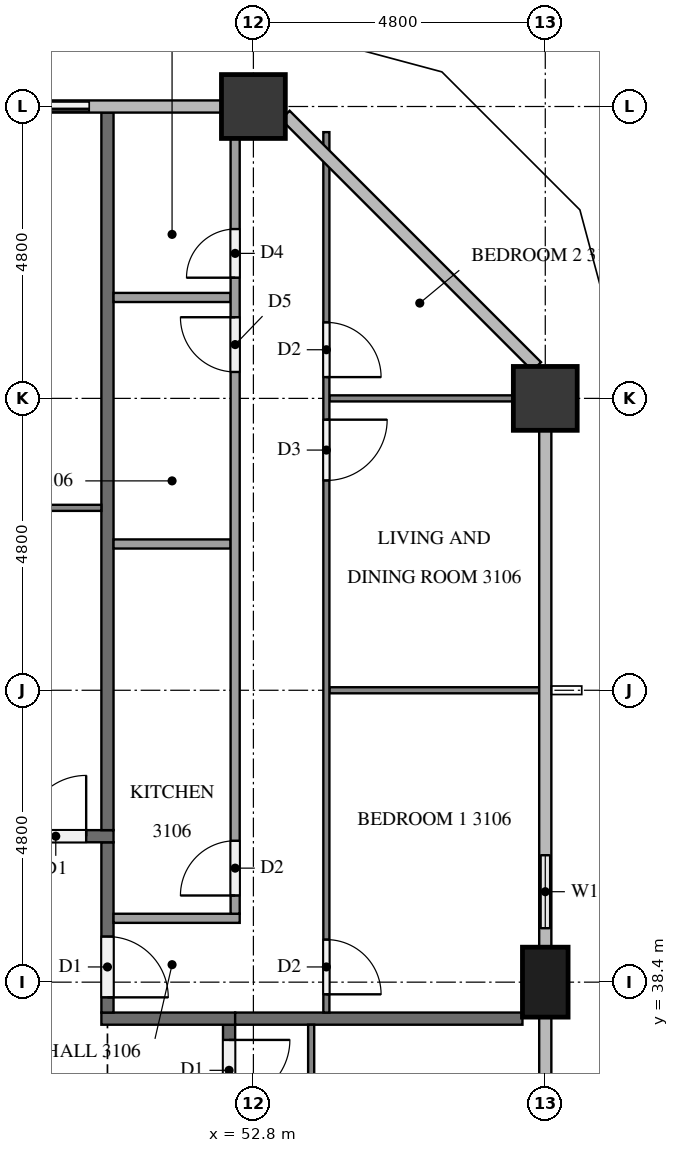
"""IFC4 building model, lengths in metres.
Left out: names, types, materials, properties, quantities, classifications, styles, units other than length and angle.
Written with IfcOpenShell. Run it as: python <this file> out.ifc"""

import sys

from ifc_helpers import new_model, si_unit, direction, frame, frame_2d, origin, origin_2d, place, context, subcontext, project, spatial, rectangle, extrude, element, fill, save


model = new_model("IFC4")
c1 = context("Model", 3, precision=1e-05, world=origin(), true_north=direction((0.0, 1.0)))
c2 = subcontext(c1, "Body", "Model", "MODEL_VIEW")
j1 = project(units=[si_unit("LENGTHUNIT", "METRE"), si_unit("PLANEANGLEUNIT", "RADIAN")], contexts=[c1])
p1 = place(None, origin())
s1 = spatial("IfcSite", under=j1, at=p1, CompositionType="ELEMENT")
p2 = place(p1, origin())
s2 = spatial("IfcBuilding", under=s1, at=p2, CompositionType="ELEMENT")
p3 = place(p2, frame((0.0, 0.0, 122.6)))
s3 = spatial("IfcBuildingStorey", under=s2, at=p3, CompositionType="ELEMENT", Elevation=122.6)
p4 = place(p3, frame((57.6, 38.4, 0.0), z_axis=(0.0, 0.0, 1.0), x_axis=(0.0, 1.0, 0.0)))
e1 = element("IfcColumn", 1, at=p4, inside=s3, PredefinedType="COLUMN", context=c2, shape_type="SweptSolid", body=[
    extrude(rectangle(XDim=1.15, YDim=0.75, at=origin_2d()), origin(), (0.0, 0.0, 1.0), 3.2),
])
for number, where, z_axis, x_axis in (
    (2, (57.6, 48.0, 0.0), (0.0, 0.0, 1.0), (1.0, 0.0, 0.0)),
    (3, (52.8, 52.8, 0.0), (0.0, 0.0, 1.0), (1.0, 0.0, 0.0)),
):
    element("IfcColumn", number, at=place(p3, frame(where, z_axis=z_axis, x_axis=x_axis)), inside=s3, PredefinedType="COLUMN", context=c2, shape_type="SweptSolid", body=[
        extrude(rectangle(XDim=1.05, YDim=1.05, at=origin_2d()), origin(), (0.0, 0.0, 1.0), 3.2),
    ])
p5 = place(p3, frame((57.6, 38.975, 0.0), z_axis=(0.0, 0.0, 1.0), x_axis=(0.0, 1.0, 0.0)))
e4 = element("IfcWall", 4, at=p5, inside=s3, PredefinedType="SOLIDWALL", context=c2, shape_type="SweptSolid", body=[
    extrude(rectangle(XDim=1.825, YDim=0.15, at=frame_2d((0.913, 0.0))), origin(), (0.0, 0.0, 1.0), 3.2),
])
p6 = place(p5, frame((0.312, 0.0, 0.9)))
e5 = element("IfcOpeningElement", 5, at=p6, cuts=e4, PredefinedType="OPENING", context=c2, shape_type="SweptSolid", body=[
    extrude(rectangle(XDim=1.2, YDim=1.4, at=frame_2d((0.6, 0.7))), frame((0.0, 0.085, 0.0), z_axis=(0.0, -1.0, 0.0), x_axis=(1.0, 0.0, 0.0)), (0.0, 0.0, 1.0), 0.17),
])
p7 = place(p3, frame((50.4, 52.8, 0.0), z_axis=(0.0, 0.0, 1.0), x_axis=(-1.0, 0.0, 0.0)))
e6 = element("IfcWall", 6, at=p7, inside=s3, PredefinedType="SOLIDWALL", context=c2, shape_type="SweptSolid", body=[
    extrude(rectangle(XDim=2.4, YDim=0.15, at=frame_2d((1.2, 0.0))), origin(), (0.0, 0.0, 1.0), 3.2),
])
p8 = place(p7, frame((0.3, 0.0, 0.0)))
e7 = element("IfcOpeningElement", 7, at=p8, cuts=e6, PredefinedType="OPENING", context=c2, shape_type="SweptSolid", body=[
    extrude(rectangle(XDim=1.8, YDim=2.4, at=frame_2d((0.9, 1.2))), frame((0.0, 0.085, 0.0), z_axis=(0.0, -1.0, 0.0), x_axis=(1.0, 0.0, 0.0)), (0.0, 0.0, 1.0), 0.17),
])
p9 = place(p3, frame((52.4, 37.7, 0.0), z_axis=(0.0, 0.0, 1.0), x_axis=(0.0, -1.0, 0.0)))
e8 = element("IfcWall", 8, at=p9, inside=s3, PredefinedType="PARTITIONING", context=c2, shape_type="SweptSolid", body=[
    extrude(rectangle(XDim=22.6, YDim=0.2, at=frame_2d((11.3, 0.0))), origin(), (0.0, 0.0, 1.0), 3.2),
])
p10 = place(p9, frame((0.25, 0.0, 0.0)))
e9 = element("IfcOpeningElement", 9, at=p10, cuts=e8, PredefinedType="OPENING", context=c2, shape_type="SweptSolid", body=[
    extrude(rectangle(XDim=1.0, YDim=2.1, at=frame_2d((0.5, 1.05))), frame((0.0, 0.11, 0.0), z_axis=(0.0, -1.0, 0.0), x_axis=(1.0, 0.0, 0.0)), (0.0, 0.0, 1.0), 0.22),
])
p11 = place(p3, frame((52.5, 37.8, 0.0), z_axis=(0.0, 0.0, 1.0), x_axis=(-1.0, 0.0, 0.0)))
e10 = element("IfcWall", 10, at=p11, inside=s3, PredefinedType="PARTITIONING", context=c2, shape_type="SweptSolid", body=[
    extrude(rectangle(XDim=2.2, YDim=0.2, at=frame_2d((1.1, 0.0))), origin(), (0.0, 0.0, 1.0), 3.2),
])
p12 = place(p3, frame((50.4, 40.7, 0.0), z_axis=(0.0, 0.0, 1.0), x_axis=(0.0, -1.0, 0.0)))
e11 = element("IfcWall", 11, at=p12, inside=s3, PredefinedType="PARTITIONING", context=c2, shape_type="SweptSolid", body=[
    extrude(rectangle(XDim=2.8, YDim=0.2, at=frame_2d((1.4, 0.0))), origin(), (0.0, 0.0, 1.0), 3.2),
])
p13 = place(p12, frame((1.55, 0.0, 0.0)))
e12 = element("IfcOpeningElement", 12, at=p13, cuts=e11, PredefinedType="OPENING", context=c2, shape_type="SweptSolid", body=[
    extrude(rectangle(XDim=1.0, YDim=2.1, at=frame_2d((0.5, 1.05))), frame((0.0, 0.11, 0.0), z_axis=(0.0, -1.0, 0.0), x_axis=(1.0, 0.0, 0.0)), (0.0, 0.0, 1.0), 0.22),
])
p14 = place(p3, frame((11.9, 40.8, 0.0), z_axis=(0.0, 0.0, 1.0), x_axis=(1.0, 0.0, 0.0)))
e13 = element("IfcWall", 13, at=p14, inside=s3, PredefinedType="PARTITIONING", context=c2, shape_type="SweptSolid", body=[
    extrude(rectangle(XDim=38.6, YDim=0.2, at=frame_2d((19.3, 0.0))), origin(), (0.0, 0.0, 1.0), 3.2),
])
p15 = place(p14, frame((37.15, 0.0, 0.0)))
e14 = element("IfcOpeningElement", 14, at=p15, cuts=e13, PredefinedType="OPENING", context=c2, shape_type="SweptSolid", body=[
    extrude(rectangle(XDim=1.0, YDim=2.1, at=frame_2d((0.5, 1.05))), frame((0.0, 0.11, 0.0), z_axis=(0.0, -1.0, 0.0), x_axis=(1.0, 0.0, 0.0)), (0.0, 0.0, 1.0), 0.22),
])
p16 = place(p14, frame((27.55, 0.0, 0.0)))
e15 = element("IfcOpeningElement", 15, at=p16, cuts=e13, PredefinedType="OPENING", context=c2, shape_type="SweptSolid", body=[
    extrude(rectangle(XDim=1.0, YDim=2.1, at=frame_2d((0.5, 1.05))), frame((0.0, 0.11, 0.0), z_axis=(0.0, -1.0, 0.0), x_axis=(1.0, 0.0, 0.0)), (0.0, 0.0, 1.0), 0.22),
])
p17 = place(p14, frame((13.15, 0.0, 0.0)))
e16 = element("IfcOpeningElement", 16, at=p17, cuts=e13, PredefinedType="OPENING", context=c2, shape_type="SweptSolid", body=[
    extrude(rectangle(XDim=1.0, YDim=2.1, at=frame_2d((0.5, 1.05))), frame((0.0, 0.11, 0.0), z_axis=(0.0, -1.0, 0.0), x_axis=(1.0, 0.0, 0.0)), (0.0, 0.0, 1.0), 0.22),
])
p18 = place(p3, frame((52.5, 37.8, 0.0), z_axis=(0.0, 0.0, 1.0), x_axis=(1.0, 0.0, 0.0)))
e17 = element("IfcWall", 17, at=p18, inside=s3, PredefinedType="PARTITIONING", context=c2, shape_type="SweptSolid", body=[
    extrude(rectangle(XDim=4.725, YDim=0.2, at=frame_2d((2.363, 0.0))), origin(), (0.0, 0.0, 1.0), 3.2),
])
p19 = place(p3, frame((50.4, 40.9, 0.0), z_axis=(0.0, 0.0, 1.0), x_axis=(0.0, 1.0, 0.0)))
e18 = element("IfcWall", 18, at=p19, inside=s3, PredefinedType="PARTITIONING", context=c2, shape_type="SweptSolid", body=[
    extrude(rectangle(XDim=11.8, YDim=0.2, at=frame_2d((5.9, 0.0))), origin(), (0.0, 0.0, 1.0), 3.2),
])
p20 = place(p3, frame((53.75, 37.7, 0.0), z_axis=(0.0, 0.0, 1.0), x_axis=(0.0, -1.0, 0.0)))
e19 = element("IfcWall", 19, at=p20, inside=s3, PredefinedType="PARTITIONING", context=c2, shape_type="SweptSolid", body=[
    extrude(rectangle(XDim=22.6, YDim=0.1, at=frame_2d((11.3, 0.0))), origin(), (0.0, 0.0, 1.0), 3.2),
])
p21 = place(p20, frame((2.85, 0.0, 0.0)))
e20 = element("IfcOpeningElement", 20, at=p21, cuts=e19, PredefinedType="OPENING", context=c2, shape_type="SweptSolid", body=[
    extrude(rectangle(XDim=0.9, YDim=2.1, at=frame_2d((0.45, 1.05))), frame((0.0, 0.06, 0.0), z_axis=(0.0, -1.0, 0.0), x_axis=(1.0, 0.0, 0.0)), (0.0, 0.0, 1.0), 0.12),
])
p22 = place(p20, frame((4.45, 0.0, 0.0)))
e21 = element("IfcOpeningElement", 21, at=p22, cuts=e19, PredefinedType="OPENING", context=c2, shape_type="SweptSolid", body=[
    extrude(rectangle(XDim=0.8, YDim=2.1, at=frame_2d((0.4, 1.05))), frame((0.0, 0.06, 0.0), z_axis=(0.0, -1.0, 0.0), x_axis=(1.0, 0.0, 0.0)), (0.0, 0.0, 1.0), 0.12),
])
p23 = place(p20, frame((7.65, 0.0, 0.0)))
e22 = element("IfcOpeningElement", 22, at=p23, cuts=e19, PredefinedType="OPENING", context=c2, shape_type="SweptSolid", body=[
    extrude(rectangle(XDim=0.9, YDim=2.1, at=frame_2d((0.45, 1.05))), frame((0.0, 0.06, 0.0), z_axis=(0.0, -1.0, 0.0), x_axis=(1.0, 0.0, 0.0)), (0.0, 0.0, 1.0), 0.12),
])
p24 = place(p20, frame((9.25, 0.0, 0.0)))
e23 = element("IfcOpeningElement", 23, at=p24, cuts=e19, PredefinedType="OPENING", context=c2, shape_type="SweptSolid", body=[
    extrude(rectangle(XDim=0.9, YDim=2.1, at=frame_2d((0.45, 1.05))), frame((0.0, 0.06, 0.0), z_axis=(0.0, -1.0, 0.0), x_axis=(1.0, 0.0, 0.0)), (0.0, 0.0, 1.0), 0.12),
])
p25 = place(p20, frame((17.15, 0.0, 0.0)))
e24 = element("IfcOpeningElement", 24, at=p25, cuts=e19, PredefinedType="OPENING", context=c2, shape_type="SweptSolid", body=[
    extrude(rectangle(XDim=1.0, YDim=2.1, at=frame_2d((0.5, 1.05))), frame((0.0, 0.06, 0.0), z_axis=(0.0, -1.0, 0.0), x_axis=(1.0, 0.0, 0.0)), (0.0, 0.0, 1.0), 0.12),
])
p26 = place(p20, frame((18.85, 0.0, 0.0)))
e25 = element("IfcOpeningElement", 25, at=p26, cuts=e19, PredefinedType="OPENING", context=c2, shape_type="SweptSolid", body=[
    extrude(rectangle(XDim=0.9, YDim=2.1, at=frame_2d((0.45, 1.05))), frame((0.0, 0.06, 0.0), z_axis=(0.0, -1.0, 0.0), x_axis=(1.0, 0.0, 0.0)), (0.0, 0.0, 1.0), 0.12),
])
p27 = place(p3, frame((54.05, 43.2, 0.0), z_axis=(0.0, 0.0, 1.0), x_axis=(1.0, 0.0, 0.0)))
e26 = element("IfcWall", 26, at=p27, inside=s3, PredefinedType="PARTITIONING", context=c2, shape_type="SweptSolid", body=[
    extrude(rectangle(XDim=3.45, YDim=0.1, at=frame_2d((1.725, 0.0))), origin(), (0.0, 0.0, 1.0), 3.2),
])
p28 = place(p3, frame((54.05, 48.0, 0.0), z_axis=(0.0, 0.0, 1.0), x_axis=(1.0, 0.0, 0.0)))
e27 = element("IfcWall", 27, at=p28, inside=s3, PredefinedType="PARTITIONING", context=c2, shape_type="SweptSolid", body=[
    extrude(rectangle(XDim=3.025, YDim=0.1, at=frame_2d((1.512, 0.0))), origin(), (0.0, 0.0, 1.0), 3.2),
])
p29 = place(p3, frame((54.0, 52.378, 0.0), z_axis=(0.0, 0.0, 1.0), x_axis=(0.0, -1.0, 0.0)))
e28 = element("IfcWall", 28, at=p29, inside=s3, PredefinedType="PARTITIONING", context=c2, shape_type="SweptSolid", body=[
    extrude(rectangle(XDim=14.479, YDim=0.1, at=frame_2d((7.239, 0.0))), origin(), (0.0, 0.0, 1.0), 3.2),
])
p30 = place(p29, frame((13.279, 0.0, 0.0)))
e29 = element("IfcOpeningElement", 29, at=p30, cuts=e28, PredefinedType="OPENING", context=c2, shape_type="SweptSolid", body=[
    extrude(rectangle(XDim=0.9, YDim=2.1, at=frame_2d((0.45, 1.05))), frame((0.0, 0.06, 0.0), z_axis=(0.0, -1.0, 0.0), x_axis=(1.0, 0.0, 0.0)), (0.0, 0.0, 1.0), 0.12),
])
p31 = place(p29, frame((4.729, 0.0, 0.0)))
e30 = element("IfcOpeningElement", 30, at=p31, cuts=e28, PredefinedType="OPENING", context=c2, shape_type="SweptSolid", body=[
    extrude(rectangle(XDim=1.0, YDim=2.1, at=frame_2d((0.5, 1.05))), frame((0.0, 0.06, 0.0), z_axis=(0.0, -1.0, 0.0), x_axis=(1.0, 0.0, 0.0)), (0.0, 0.0, 1.0), 0.12),
])
p32 = place(p29, frame((3.128, 0.0, 0.0)))
e31 = element("IfcOpeningElement", 31, at=p32, cuts=e28, PredefinedType="OPENING", context=c2, shape_type="SweptSolid", body=[
    extrude(rectangle(XDim=0.9, YDim=2.1, at=frame_2d((0.45, 1.05))), frame((0.0, 0.06, 0.0), z_axis=(0.0, -1.0, 0.0), x_axis=(1.0, 0.0, 0.0)), (0.0, 0.0, 1.0), 0.12),
])
for number, where, z_axis, x_axis in (
    (32, (50.5, 45.606, 0.0), (0.0, 0.0, 1.0), (1.0, 0.0, 0.0)),
    (33, (50.5, 49.66, 0.0), (0.0, 0.0, 1.0), (1.0, 0.0, 0.0)),
):
    element("IfcWall", number, at=place(p3, frame(where, z_axis=z_axis, x_axis=x_axis)), inside=s3, PredefinedType="PARTITIONING", context=c2, shape_type="SweptSolid", body=[
        extrude(rectangle(XDim=1.925, YDim=0.15, at=frame_2d((0.962, 0.0))), origin(), (0.0, 0.0, 1.0), 3.2),
    ])
p33 = place(p3, frame((50.5, 39.45, 0.0), z_axis=(0.0, 0.0, 1.0), x_axis=(1.0, 0.0, 0.0)))
e34 = element("IfcWall", 34, at=p33, inside=s3, PredefinedType="PARTITIONING", context=c2, shape_type="SweptSolid", body=[
    extrude(rectangle(XDim=2.075, YDim=0.15, at=frame_2d((1.038, 0.0))), origin(), (0.0, 0.0, 1.0), 3.2),
])
p34 = place(p3, frame((52.5, 39.525, 0.0), z_axis=(0.0, 0.0, 1.0), x_axis=(0.0, 1.0, 0.0)))
e35 = element("IfcWall", 35, at=p34, inside=s3, PredefinedType="PARTITIONING", context=c2, shape_type="SweptSolid", body=[
    extrude(rectangle(XDim=12.75, YDim=0.15, at=frame_2d((6.375, 0.0))), origin(), (0.0, 0.0, 1.0), 3.2),
])
p35 = place(p34, frame((0.3, 0.0, 0.0)))
e36 = element("IfcOpeningElement", 36, at=p35, cuts=e35, PredefinedType="OPENING", context=c2, shape_type="SweptSolid", body=[
    extrude(rectangle(XDim=0.9, YDim=2.1, at=frame_2d((0.45, 1.05))), frame((0.0, 0.085, 0.0), z_axis=(0.0, -1.0, 0.0), x_axis=(1.0, 0.0, 0.0)), (0.0, 0.0, 1.0), 0.17),
])
p36 = place(p34, frame((8.91, 0.0, 0.0)))
e37 = element("IfcOpeningElement", 37, at=p36, cuts=e35, PredefinedType="OPENING", context=c2, shape_type="SweptSolid", body=[
    extrude(rectangle(XDim=0.9, YDim=2.1, at=frame_2d((0.45, 1.05))), frame((0.0, 0.085, 0.0), z_axis=(0.0, -1.0, 0.0), x_axis=(1.0, 0.0, 0.0)), (0.0, 0.0, 1.0), 0.17),
])
p37 = place(p34, frame((10.46, 0.0, 0.0)))
e38 = element("IfcOpeningElement", 38, at=p37, cuts=e35, PredefinedType="OPENING", context=c2, shape_type="SweptSolid", body=[
    extrude(rectangle(XDim=0.8, YDim=2.1, at=frame_2d((0.4, 1.05))), frame((0.0, 0.085, 0.0), z_axis=(0.0, -1.0, 0.0), x_axis=(1.0, 0.0, 0.0)), (0.0, 0.0, 1.0), 0.17),
])
p38 = place(p3, frame((40.9, 46.2, 0.0), z_axis=(0.0, 0.0, 1.0), x_axis=(1.0, 0.0, 0.0)))
e39 = element("IfcWall", 39, at=p38, inside=s3, PredefinedType="PARTITIONING", context=c2, shape_type="SweptSolid", body=[
    extrude(rectangle(XDim=9.4, YDim=0.1, at=frame_2d((4.7, 0.0))), origin(), (0.0, 0.0, 1.0), 3.2),
])
p39 = place(p38, frame((5.05, 0.0, 0.0)))
e40 = element("IfcOpeningElement", 40, at=p39, cuts=e39, PredefinedType="OPENING", context=c2, shape_type="SweptSolid", body=[
    extrude(rectangle(XDim=1.0, YDim=2.1, at=frame_2d((0.5, 1.05))), frame((0.0, 0.06, 0.0), z_axis=(0.0, -1.0, 0.0), x_axis=(1.0, 0.0, 0.0)), (0.0, 0.0, 1.0), 0.12),
])
p40 = place(p38, frame((3.45, 0.0, 0.0)))
e41 = element("IfcOpeningElement", 41, at=p40, cuts=e39, PredefinedType="OPENING", context=c2, shape_type="SweptSolid", body=[
    extrude(rectangle(XDim=0.9, YDim=2.1, at=frame_2d((0.45, 1.05))), frame((0.0, 0.06, 0.0), z_axis=(0.0, -1.0, 0.0), x_axis=(1.0, 0.0, 0.0)), (0.0, 0.0, 1.0), 0.12),
])
p41 = place(p6, origin())
e42 = element("IfcWindow", 42, at=p41, inside=s3, PartitioningType="SINGLE_PANEL", PredefinedType="WINDOW", context=c2, shape_type="SweptSolid", body=[
    extrude(rectangle(XDim=1.2, YDim=1.4, at=frame_2d((0.6, 0.7))), frame((0.0, 0.03, 0.0), z_axis=(0.0, -1.0, 0.0), x_axis=(1.0, 0.0, 0.0)), (0.0, 0.0, 1.0), 0.06),
])
fill(e5, e42)
p42 = place(p8, origin())
e43 = element("IfcDoor", 43, at=p42, inside=s3, OperationType="SLIDING_TO_LEFT", PredefinedType="DOOR", context=c2, shape_type="SweptSolid", body=[
    extrude(rectangle(XDim=1.8, YDim=2.4, at=frame_2d((0.9, 1.2))), frame((0.0, 0.025, 0.0), z_axis=(0.0, -1.0, 0.0), x_axis=(1.0, 0.0, 0.0)), (0.0, 0.0, 1.0), 0.05),
])
fill(e7, e43)
p43 = place(p10, origin())
e44 = element("IfcDoor", 44, at=p43, inside=s3, OperationType="SINGLE_SWING_LEFT", PredefinedType="DOOR", context=c2, shape_type="SweptSolid", body=[
    extrude(rectangle(XDim=1.0, YDim=2.1, at=frame_2d((0.5, 1.05))), frame((0.0, 0.025, 0.0), z_axis=(0.0, -1.0, 0.0), x_axis=(1.0, 0.0, 0.0)), (0.0, 0.0, 1.0), 0.05),
])
fill(e9, e44)
p44 = place(p13, origin())
e45 = element("IfcDoor", 45, at=p44, inside=s3, OperationType="SINGLE_SWING_RIGHT", PredefinedType="DOOR", context=c2, shape_type="SweptSolid", body=[
    extrude(rectangle(XDim=1.0, YDim=2.1, at=frame_2d((0.5, 1.05))), frame((0.0, 0.025, 0.0), z_axis=(0.0, -1.0, 0.0), x_axis=(1.0, 0.0, 0.0)), (0.0, 0.0, 1.0), 0.05),
])
fill(e12, e45)
p45 = place(p15, origin())
e46 = element("IfcDoor", 46, at=p45, inside=s3, OperationType="SINGLE_SWING_RIGHT", PredefinedType="DOOR", context=c2, shape_type="SweptSolid", body=[
    extrude(rectangle(XDim=1.0, YDim=2.1, at=frame_2d((0.5, 1.05))), frame((0.0, 0.025, 0.0), z_axis=(0.0, -1.0, 0.0), x_axis=(1.0, 0.0, 0.0)), (0.0, 0.0, 1.0), 0.05),
])
fill(e14, e46)
p46 = place(p30, origin())
e47 = element("IfcDoor", 47, at=p46, inside=s3, OperationType="SINGLE_SWING_RIGHT", PredefinedType="DOOR", context=c2, shape_type="SweptSolid", body=[
    extrude(rectangle(XDim=0.9, YDim=2.1, at=frame_2d((0.45, 1.05))), frame((0.0, 0.025, 0.0), z_axis=(0.0, -1.0, 0.0), x_axis=(1.0, 0.0, 0.0)), (0.0, 0.0, 1.0), 0.05),
])
fill(e29, e47)
p47 = place(p31, origin())
e48 = element("IfcDoor", 48, at=p47, inside=s3, OperationType="SINGLE_SWING_LEFT", PredefinedType="DOOR", context=c2, shape_type="SweptSolid", body=[
    extrude(rectangle(XDim=1.0, YDim=2.1, at=frame_2d((0.5, 1.05))), frame((0.0, 0.025, 0.0), z_axis=(0.0, -1.0, 0.0), x_axis=(1.0, 0.0, 0.0)), (0.0, 0.0, 1.0), 0.05),
])
fill(e30, e48)
p48 = place(p32, origin())
e49 = element("IfcDoor", 49, at=p48, inside=s3, OperationType="SINGLE_SWING_RIGHT", PredefinedType="DOOR", context=c2, shape_type="SweptSolid", body=[
    extrude(rectangle(XDim=0.9, YDim=2.1, at=frame_2d((0.45, 1.05))), frame((0.0, 0.025, 0.0), z_axis=(0.0, -1.0, 0.0), x_axis=(1.0, 0.0, 0.0)), (0.0, 0.0, 1.0), 0.05),
])
fill(e31, e49)
p49 = place(p35, origin())
e50 = element("IfcDoor", 50, at=p49, inside=s3, OperationType="SINGLE_SWING_LEFT", PredefinedType="DOOR", context=c2, shape_type="SweptSolid", body=[
    extrude(rectangle(XDim=0.9, YDim=2.1, at=frame_2d((0.45, 1.05))), frame((0.0, 0.025, 0.0), z_axis=(0.0, -1.0, 0.0), x_axis=(1.0, 0.0, 0.0)), (0.0, 0.0, 1.0), 0.05),
])
fill(e36, e50)
p50 = place(p36, origin())
e51 = element("IfcDoor", 51, at=p50, inside=s3, OperationType="SINGLE_SWING_RIGHT", PredefinedType="DOOR", context=c2, shape_type="SweptSolid", body=[
    extrude(rectangle(XDim=0.9, YDim=2.1, at=frame_2d((0.45, 1.05))), frame((0.0, 0.025, 0.0), z_axis=(0.0, -1.0, 0.0), x_axis=(1.0, 0.0, 0.0)), (0.0, 0.0, 1.0), 0.05),
])
fill(e37, e51)
p51 = place(p37, origin())
e52 = element("IfcDoor", 52, at=p51, inside=s3, OperationType="SINGLE_SWING_LEFT", PredefinedType="DOOR", context=c2, shape_type="SweptSolid", body=[
    extrude(rectangle(XDim=0.8, YDim=2.1, at=frame_2d((0.4, 1.05))), frame((0.0, 0.025, 0.0), z_axis=(0.0, -1.0, 0.0), x_axis=(1.0, 0.0, 0.0)), (0.0, 0.0, 1.0), 0.05),
])
fill(e38, e52)
save(model, sys.argv[1])
